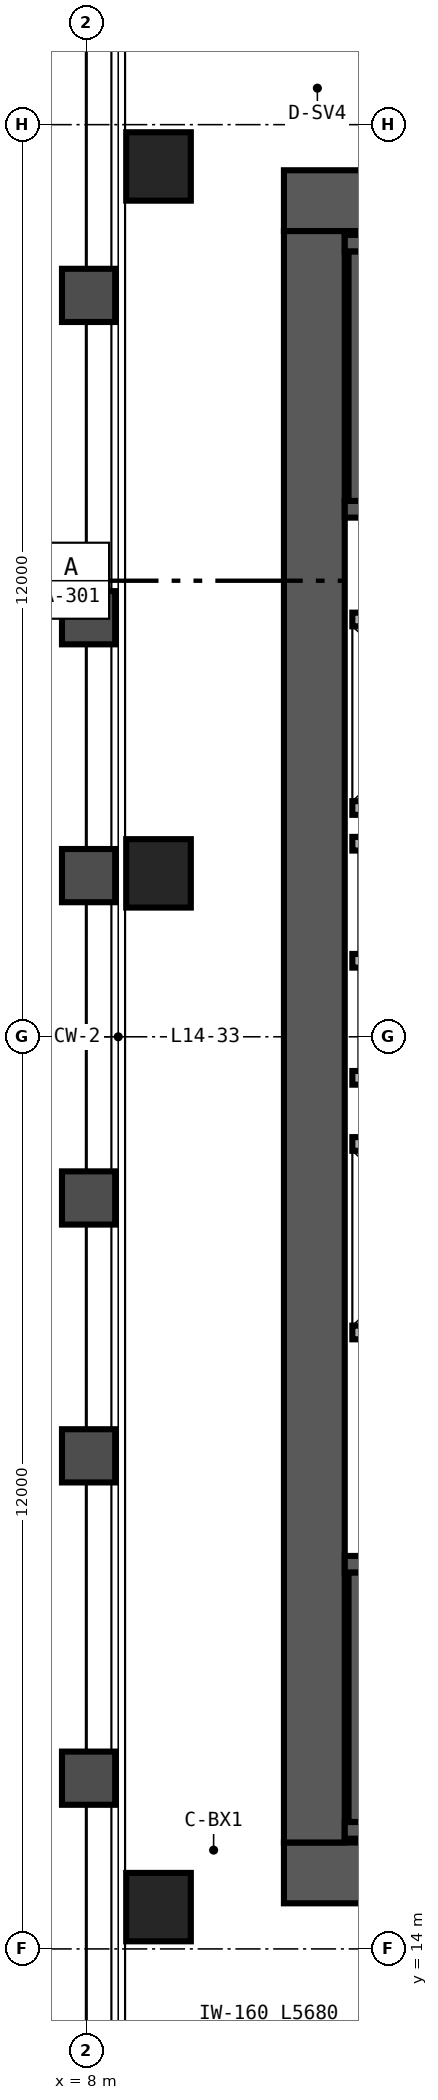
"""IFC4 building model, lengths in metres.
Left out: names, types, materials, properties, quantities, classifications, styles, units other than length and angle.
Written with IfcOpenShell. Run it as: python <this file> out.ifc"""

import sys

from ifc_helpers import new_model, si_unit, direction, frame, frame_2d, origin, origin_2d, place, context, subcontext, project, spatial, rectangle, hollow_rectangle, extrude, source, transform, mapped, element, save


model = new_model("IFC4")
c1 = context("Model", 3, precision=1e-05, world=origin(), true_north=direction((0.0, 1.0)))
c2 = subcontext(c1, "Body", "Model", "MODEL_VIEW")
j1 = project(units=[si_unit("LENGTHUNIT", "METRE"), si_unit("PLANEANGLEUNIT", "RADIAN")], contexts=[c1])
p1 = place(None, origin())
s1 = spatial("IfcSite", under=j1, at=p1, CompositionType="ELEMENT")
p2 = place(p1, origin())
s2 = spatial("IfcBuilding", under=s1, at=p2, CompositionType="ELEMENT")
p3 = place(p2, frame((0.0, 0.0, 60.0)))
s3 = spatial("IfcBuildingStorey", under=s2, at=p3, CompositionType="ELEMENT", Elevation=60.0)
p4 = place(p3, frame((10.6, 15.0, 0.0), z_axis=(0.0, 0.0, 1.0), x_axis=(1.0, 0.0, 0.0)))
e1 = element("IfcWall", 1, at=p4, inside=s3, PredefinedType="SHEAR", context=c2, shape_type="SweptSolid", body=[
    extrude(rectangle(XDim=12.8, YDim=0.8, at=frame_2d((6.4, 0.0))), origin(), (0.0, 0.0, 1.0), 3.35),
])
p5 = place(p4, frame((10.3, 0.0, 0.0)))
e2 = element("IfcOpeningElement", 2, at=p5, cuts=e1, PredefinedType="OPENING", context=c2, shape_type="SweptSolid", body=[
    extrude(rectangle(XDim=1.0, YDim=2.15, at=frame_2d((0.5, 1.075))), frame((0.0, 0.41, 0.0), z_axis=(0.0, -1.0, 0.0), x_axis=(1.0, 0.0, 0.0)), (0.0, 0.0, 1.0), 0.82),
])
p6 = place(p3, frame((10.6, 37.0, 0.0), z_axis=(0.0, 0.0, 1.0), x_axis=(1.0, 0.0, 0.0)))
e3 = element("IfcWall", 3, at=p6, inside=s3, PredefinedType="SHEAR", context=c2, shape_type="SweptSolid", body=[
    extrude(rectangle(XDim=12.8, YDim=0.8, at=frame_2d((6.4, 0.0))), origin(), (0.0, 0.0, 1.0), 3.35),
])
p7 = place(p6, frame((8.98, 0.0, 0.0)))
e4 = element("IfcOpeningElement", 4, at=p7, cuts=e3, PredefinedType="OPENING", context=c2, shape_type="SweptSolid", body=[
    extrude(rectangle(XDim=1.0, YDim=2.15, at=frame_2d((0.5, 1.075))), frame((0.0, 0.41, 0.0), z_axis=(0.0, -1.0, 0.0), x_axis=(1.0, 0.0, 0.0)), (0.0, 0.0, 1.0), 0.82),
])
p8 = place(p3, frame((11.0, 15.4, 0.0), z_axis=(0.0, 0.0, 1.0), x_axis=(0.0, 1.0, 0.0)))
e5 = element("IfcWall", 5, at=p8, inside=s3, PredefinedType="SHEAR", context=c2, shape_type="SweptSolid", body=[
    extrude(rectangle(XDim=21.2, YDim=0.8, at=frame_2d((10.6, 0.0))), origin(), (0.0, 0.0, 1.0), 3.35),
])
p9 = place(p3, frame((11.4, 15.56, 0.0), z_axis=(0.0, 0.0, 1.0), x_axis=(1.0, 0.0, 0.0)))
e6 = element("IfcWall", 6, at=p9, inside=s3, PredefinedType="SHEAR", context=c2, shape_type="SweptSolid", body=[
    extrude(rectangle(XDim=7.91, YDim=0.22, at=frame_2d((3.955, 0.0))), origin(), (0.0, 0.0, 1.0), 3.4),
])
p10 = place(p3, frame((11.4, 19.06, 0.0), z_axis=(0.0, 0.0, 1.0), x_axis=(1.0, 0.0, 0.0)))
e7 = element("IfcWall", 7, at=p10, inside=s3, PredefinedType="SHEAR", context=c2, shape_type="SweptSolid", body=[
    extrude(rectangle(XDim=7.91, YDim=0.22, at=frame_2d((3.955, 0.0))), origin(), (0.0, 0.0, 1.0), 3.4),
])
p11 = place(p10, frame((0.52, 0.0, 0.0)))
e8 = element("IfcOpeningElement", 8, at=p11, cuts=e7, PredefinedType="OPENING", context=c2, shape_type="SweptSolid", body=[
    extrude(rectangle(XDim=1.05, YDim=2.15, at=frame_2d((0.525, 1.075))), frame((0.0, 0.12, 0.0), z_axis=(0.0, -1.0, 0.0), x_axis=(1.0, 0.0, 0.0)), (0.0, 0.0, 1.0), 0.24),
])
p12 = place(p3, frame((11.56, 15.67, 0.0), z_axis=(0.0, 0.0, 1.0), x_axis=(0.0, 1.0, 0.0)))
e9 = element("IfcWall", 9, at=p12, inside=s3, PredefinedType="SHEAR", context=c2, shape_type="SweptSolid", body=[
    extrude(rectangle(XDim=3.28, YDim=0.22, at=frame_2d((1.64, 0.0))), origin(), (0.0, 0.0, 1.0), 3.4),
])
p13 = place(p3, frame((11.4, 32.94, 0.0), z_axis=(0.0, 0.0, 1.0), x_axis=(1.0, 0.0, 0.0)))
e10 = element("IfcWall", 10, at=p13, inside=s3, PredefinedType="SHEAR", context=c2, shape_type="SweptSolid", body=[
    extrude(rectangle(XDim=7.91, YDim=0.22, at=frame_2d((3.955, 0.0))), origin(), (0.0, 0.0, 1.0), 3.4),
])
p14 = place(p13, frame((0.52, 0.0, 0.0)))
e11 = element("IfcOpeningElement", 11, at=p14, cuts=e10, PredefinedType="OPENING", context=c2, shape_type="SweptSolid", body=[
    extrude(rectangle(XDim=1.05, YDim=2.15, at=frame_2d((0.525, 1.075))), frame((0.0, 0.12, 0.0), z_axis=(0.0, -1.0, 0.0), x_axis=(1.0, 0.0, 0.0)), (0.0, 0.0, 1.0), 0.24),
])
p15 = place(p3, frame((11.4, 36.44, 0.0), z_axis=(0.0, 0.0, 1.0), x_axis=(1.0, 0.0, 0.0)))
e12 = element("IfcWall", 12, at=p15, inside=s3, PredefinedType="SHEAR", context=c2, shape_type="SweptSolid", body=[
    extrude(rectangle(XDim=7.91, YDim=0.22, at=frame_2d((3.955, 0.0))), origin(), (0.0, 0.0, 1.0), 3.4),
])
p16 = place(p3, frame((11.56, 33.05, 0.0), z_axis=(0.0, 0.0, 1.0), x_axis=(0.0, 1.0, 0.0)))
e13 = element("IfcWall", 13, at=p16, inside=s3, PredefinedType="SHEAR", context=c2, shape_type="SweptSolid", body=[
    extrude(rectangle(XDim=3.28, YDim=0.22, at=frame_2d((1.64, 0.0))), origin(), (0.0, 0.0, 1.0), 3.4),
])
m1 = source(origin(), c2, "Body", "SweptSolid", [
    extrude(hollow_rectangle(XDim=0.85, YDim=0.9, WallThickness=0.04, at=origin_2d()), origin(), (0.0, 0.0, 1.0), 3.35),
])
for number, where, z_axis, x_axis in (
    (14, (8.95, 14.55, 0.0), (0.0, 0.0, 1.0), (1.0, 0.0, 0.0)),
    (15, (8.95, 28.15, 0.0), (0.0, 0.0, 1.0), (1.0, 0.0, 0.0)),
    (16, (8.95, 37.45, 0.0), (0.0, 0.0, 1.0), (1.0, 0.0, 0.0)),
):
    element("IfcColumn", number, at=place(p3, frame(where, z_axis=z_axis, x_axis=x_axis)), inside=s3, PredefinedType="COLUMN", context=c2, shape_type="MappedRepresentation", body=[
        mapped(m1, transform((0.0, 0.0, 0.0), scale=1.0)),
    ])
for number, where, z_axis, x_axis in (
    (17, (11.5, 22.11, 0.0), (0.0, 0.0, 1.0), (1.0, 0.0, 0.0)),
    (18, (11.5, 24.59, 0.0), (0.0, 0.0, 1.0), (1.0, 0.0, 0.0)),
    (19, (11.5, 29.01, 0.0), (0.0, 0.0, 1.0), (1.0, 0.0, 0.0)),
    (20, (11.5, 31.49, 0.0), (0.0, 0.0, 1.0), (1.0, 0.0, 0.0)),
):
    element("IfcWall", number, at=place(p3, frame(where, z_axis=z_axis, x_axis=x_axis)), inside=s3, PredefinedType="SOLIDWALL", context=c2, shape_type="SweptSolid", body=[
        extrude(rectangle(XDim=2.5, YDim=0.18, at=frame_2d((1.25, 0.0))), origin(), (0.0, 0.0, 1.0), 3.35),
    ])
for number, where, z_axis, x_axis in (
    (21, (11.5, 25.46, 0.0), (0.0, 0.0, 1.0), (1.0, 0.0, 0.0)),
    (22, (11.5, 27.0, 0.0), (0.0, 0.0, 1.0), (1.0, 0.0, 0.0)),
    (23, (11.5, 28.54, 0.0), (0.0, 0.0, 1.0), (1.0, 0.0, 0.0)),
):
    element("IfcWall", number, at=place(p3, frame(where, z_axis=z_axis, x_axis=x_axis)), inside=s3, PredefinedType="SOLIDWALL", context=c2, shape_type="SweptSolid", body=[
        extrude(rectangle(XDim=2.51, YDim=0.18, at=frame_2d((1.255, 0.0))), origin(), (0.0, 0.0, 1.0), 3.35),
    ])
save(model, sys.argv[1])
